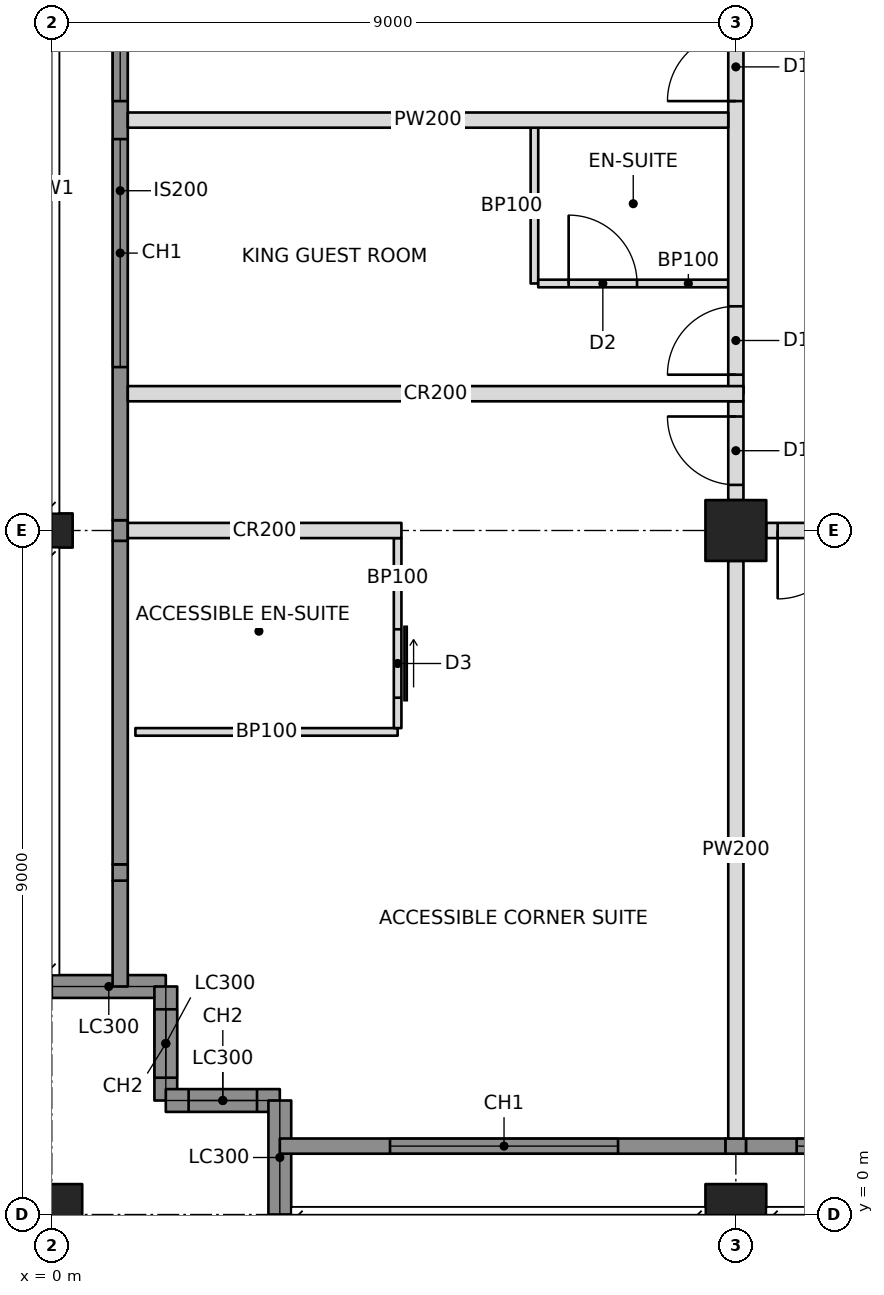
"""IFC4 building model, lengths in metres.
Left out: names, types, materials, properties, quantities, classifications, styles, units other than length and angle.
Written with IfcOpenShell. Run it as: python <this file> out.ifc"""

import sys

from ifc_helpers import new_model, si_unit, direction, frame, frame_2d, origin, origin_with_axes, origin_2d, place, context, subcontext, project, spatial, rectangle, hollow_rectangle, i_section, extrude, element, fill, save


model = new_model("IFC4")
c1 = context("Model", 3, precision=1e-05, world=origin(), true_north=direction((0.0, 1.0)))
c2 = subcontext(c1, "Body", "Model", "MODEL_VIEW")
j1 = project(units=[si_unit("LENGTHUNIT", "METRE"), si_unit("PLANEANGLEUNIT", "RADIAN")], contexts=[c1])
p1 = place(None, origin())
s1 = spatial("IfcSite", under=j1, at=p1, CompositionType="ELEMENT")
p2 = place(p1, origin())
s2 = spatial("IfcBuilding", under=s1, at=p2, CompositionType="ELEMENT")
p3 = place(p2, frame((0.0, 0.0, 180.8)))
s3 = spatial("IfcBuildingStorey", under=s2, at=p3, CompositionType="ELEMENT", Elevation=180.8)
p4 = place(p3, origin_with_axes())
e1 = element("IfcColumn", 1, at=p4, inside=s3, PredefinedType="COLUMN", context=c2, shape_type="SweptSolid", body=[
    extrude(hollow_rectangle(XDim=0.8, YDim=0.8, WallThickness=0.07, at=origin_2d()), origin(), (0.0, 0.0, 1.0), 3.4),
])
p5 = place(p3, frame((0.0, 9.0, 0.0), z_axis=(0.0, 0.0, 1.0), x_axis=(0.0, 1.0, 0.0)))
e2 = element("IfcColumn", 2, at=p5, inside=s3, PredefinedType="COLUMN", context=c2, shape_type="SweptSolid", body=[
    extrude(i_section(OverallWidth=0.449, OverallDepth=0.549, WebThickness=0.072, FlangeThickness=0.115, at=origin_2d()), origin(), (0.0, 0.0, 1.0), 3.4),
])
p6 = place(p3, frame((9.0, 0.0, 0.0), z_axis=(0.0, 0.0, 1.0), x_axis=(1.0, 0.0, 0.0)))
e3 = element("IfcColumn", 3, at=p6, inside=s3, PredefinedType="COLUMN", context=c2, shape_type="SweptSolid", body=[
    extrude(hollow_rectangle(XDim=0.8, YDim=0.8, WallThickness=0.07, at=origin_2d()), origin(), (0.0, 0.0, 1.0), 3.4),
])
p7 = place(p3, frame((9.0, 9.0, 0.0), z_axis=(0.0, 0.0, 1.0), x_axis=(1.0, 0.0, 0.0)))
e4 = element("IfcColumn", 4, at=p7, inside=s3, PredefinedType="COLUMN", context=c2, shape_type="SweptSolid", body=[
    extrude(hollow_rectangle(XDim=0.8, YDim=0.8, WallThickness=0.06, at=origin_2d()), origin(), (0.0, 0.0, 1.0), 3.4),
])
p8 = place(p3, frame((0.0, 3.0, 0.0), z_axis=(0.0, 0.0, 1.0), x_axis=(1.0, 0.0, 0.0)))
e5 = element("IfcWall", 5, at=p8, inside=s3, PredefinedType="SOLIDWALL", context=c2, shape_type="SweptSolid", body=[
    extrude(rectangle(XDim=1.5, YDim=0.3, at=frame_2d((0.75, 0.0))), origin(), (0.0, 0.0, 1.0), 2.42),
])
p9 = place(p3, frame((1.5, 3.0, 0.0), z_axis=(0.0, 0.0, 1.0), x_axis=(0.0, -1.0, 0.0)))
e6 = element("IfcWall", 6, at=p9, inside=s3, PredefinedType="SOLIDWALL", context=c2, shape_type="SweptSolid", body=[
    extrude(rectangle(XDim=1.5, YDim=0.3, at=frame_2d((0.75, 0.0))), origin(), (0.0, 0.0, 1.0), 3.2),
])
p10 = place(p9, frame((0.3, 0.0, 0.6)))
e7 = element("IfcOpeningElement", 7, at=p10, cuts=e6, PredefinedType="OPENING", context=c2, shape_type="SweptSolid", body=[
    extrude(rectangle(XDim=0.9, YDim=2.2, at=frame_2d((0.45, 1.1))), frame((0.0, 0.16, 0.0), z_axis=(0.0, -1.0, 0.0), x_axis=(1.0, 0.0, 0.0)), (0.0, 0.0, 1.0), 0.32),
])
p11 = place(p3, frame((1.5, 1.5, 0.0), z_axis=(0.0, 0.0, 1.0), x_axis=(1.0, 0.0, 0.0)))
e8 = element("IfcWall", 8, at=p11, inside=s3, PredefinedType="SOLIDWALL", context=c2, shape_type="SweptSolid", body=[
    extrude(rectangle(XDim=1.5, YDim=0.3, at=frame_2d((0.75, 0.0))), origin(), (0.0, 0.0, 1.0), 3.2),
])
p12 = place(p11, frame((0.3, 0.0, 0.6)))
e9 = element("IfcOpeningElement", 9, at=p12, cuts=e8, PredefinedType="OPENING", context=c2, shape_type="SweptSolid", body=[
    extrude(rectangle(XDim=0.9, YDim=2.2, at=frame_2d((0.45, 1.1))), frame((0.0, 0.16, 0.0), z_axis=(0.0, -1.0, 0.0), x_axis=(1.0, 0.0, 0.0)), (0.0, 0.0, 1.0), 0.32),
])
p13 = place(p3, frame((3.0, 1.5, 0.0), z_axis=(0.0, 0.0, 1.0), x_axis=(0.0, -1.0, 0.0)))
e10 = element("IfcWall", 10, at=p13, inside=s3, PredefinedType="SOLIDWALL", context=c2, shape_type="SweptSolid", body=[
    extrude(rectangle(XDim=1.5, YDim=0.3, at=frame_2d((0.75, 0.0))), origin(), (0.0, 0.0, 1.0), 2.42),
])
p14 = place(p3, frame((3.0, 0.9, 0.0), z_axis=(0.0, 0.0, 1.0), x_axis=(1.0, 0.0, 0.0)))
e11 = element("IfcWall", 11, at=p14, inside=s3, PredefinedType="SOLIDWALL", context=c2, shape_type="SweptSolid", body=[
    extrude(rectangle(XDim=5.865, YDim=0.2, at=frame_2d((2.932, 0.0))), origin(), (0.0, 0.0, 1.0), 3.2),
])
p15 = place(p14, frame((1.45, 0.0, 0.6)))
e12 = element("IfcOpeningElement", 12, at=p15, cuts=e11, PredefinedType="OPENING", context=c2, shape_type="SweptSolid", body=[
    extrude(rectangle(XDim=3.0, YDim=2.2, at=frame_2d((1.5, 1.1))), frame((0.0, 0.11, 0.0), z_axis=(0.0, -1.0, 0.0), x_axis=(1.0, 0.0, 0.0)), (0.0, 0.0, 1.0), 0.22),
])
p16 = place(p3, frame((0.9, 3.0, 0.0), z_axis=(0.0, 0.0, 1.0), x_axis=(0.0, 1.0, 0.0)))
e13 = element("IfcWall", 13, at=p16, inside=s3, PredefinedType="SOLIDWALL", context=c2, shape_type="SweptSolid", body=[
    extrude(rectangle(XDim=1.393, YDim=0.2, at=frame_2d((0.696, 0.0))), origin(), (0.0, 0.0, 1.0), 3.2),
])
p17 = place(p3, frame((1.0, 9.0, 0.0), z_axis=(0.0, 0.0, 1.0), x_axis=(1.0, 0.0, 0.0)))
e14 = element("IfcWall", 14, at=p17, inside=s3, PredefinedType="PARTITIONING", context=c2, shape_type="SweptSolid", body=[
    extrude(rectangle(XDim=3.6, YDim=0.2, at=frame_2d((1.8, 0.0))), origin(), (0.0, 0.0, 1.0), 2.438),
])
p18 = place(p3, frame((9.4, 9.0, 0.0), z_axis=(0.0, 0.0, 1.0), x_axis=(1.0, 0.0, 0.0)))
e15 = element("IfcWall", 15, at=p18, inside=s3, PredefinedType="PARTITIONING", context=c2, shape_type="SweptSolid", body=[
    extrude(rectangle(XDim=8.2, YDim=0.2, at=frame_2d((4.1, 0.0))), origin(), (0.0, 0.0, 1.0), 2.405),
])
p19 = place(p18, frame((0.15, 0.0, 0.0)))
e16 = element("IfcOpeningElement", 16, at=p19, cuts=e15, PredefinedType="OPENING", context=c2, shape_type="SweptSolid", body=[
    extrude(rectangle(XDim=0.9, YDim=2.1, at=frame_2d((0.45, 1.05))), frame((0.0, 0.11, 0.0), z_axis=(0.0, -1.0, 0.0), x_axis=(1.0, 0.0, 0.0)), (0.0, 0.0, 1.0), 0.22),
])
p20 = place(p3, frame((9.0, 10.8, 0.0), z_axis=(0.0, 0.0, 1.0), x_axis=(0.0, 1.0, 0.0)))
e17 = element("IfcWall", 17, at=p20, inside=s3, PredefinedType="PARTITIONING", context=c2, shape_type="SweptSolid", body=[
    extrude(rectangle(XDim=6.8, YDim=0.2, at=frame_2d((3.4, 0.0))), origin(), (0.0, 0.0, 1.0), 2.405),
])
p21 = place(p20, frame((0.25, 0.0, 0.0)))
e18 = element("IfcOpeningElement", 18, at=p21, cuts=e17, PredefinedType="OPENING", context=c2, shape_type="SweptSolid", body=[
    extrude(rectangle(XDim=0.9, YDim=2.1, at=frame_2d((0.45, 1.05))), frame((0.0, 0.11, 0.0), z_axis=(0.0, -1.0, 0.0), x_axis=(1.0, 0.0, 0.0)), (0.0, 0.0, 1.0), 0.22),
])
p22 = place(p20, frame((3.85, 0.0, 0.0)))
e19 = element("IfcOpeningElement", 19, at=p22, cuts=e17, PredefinedType="OPENING", context=c2, shape_type="SweptSolid", body=[
    extrude(rectangle(XDim=0.9, YDim=2.1, at=frame_2d((0.45, 1.05))), frame((0.0, 0.11, 0.0), z_axis=(0.0, -1.0, 0.0), x_axis=(1.0, 0.0, 0.0)), (0.0, 0.0, 1.0), 0.22),
])
p23 = place(p3, frame((1.0, 10.8, 0.0), z_axis=(0.0, 0.0, 1.0), x_axis=(1.0, 0.0, 0.0)))
e20 = element("IfcWall", 20, at=p23, inside=s3, PredefinedType="PARTITIONING", context=c2, shape_type="SweptSolid", body=[
    extrude(rectangle(XDim=8.1, YDim=0.2, at=frame_2d((4.05, 0.0))), origin(), (0.0, 0.0, 1.0), 2.404),
])
p24 = place(p3, frame((9.0, 8.6, 0.0), z_axis=(0.0, 0.0, 1.0), x_axis=(0.0, -1.0, 0.0)))
e21 = element("IfcWall", 21, at=p24, inside=s3, PredefinedType="PARTITIONING", context=c2, shape_type="SweptSolid", body=[
    extrude(rectangle(XDim=7.6, YDim=0.2, at=frame_2d((3.8, 0.0))), origin(), (0.0, 0.0, 1.0), 2.438),
])
p25 = place(p3, frame((1.1, 6.35, 0.0), z_axis=(0.0, 0.0, 1.0), x_axis=(1.0, 0.0, 0.0)))
e22 = element("IfcWall", 22, at=p25, inside=s3, PredefinedType="PARTITIONING", context=c2, shape_type="SweptSolid", body=[
    extrude(rectangle(XDim=3.45, YDim=0.1, at=frame_2d((1.725, 0.0))), origin(), (0.0, 0.0, 1.0), 3.2),
])
p26 = place(p3, frame((4.55, 8.9, 0.0), z_axis=(0.0, 0.0, 1.0), x_axis=(0.0, -1.0, 0.0)))
e23 = element("IfcWall", 23, at=p26, inside=s3, PredefinedType="PARTITIONING", context=c2, shape_type="SweptSolid", body=[
    extrude(rectangle(XDim=2.5, YDim=0.1, at=frame_2d((1.25, 0.0))), origin(), (0.0, 0.0, 1.0), 2.438),
])
p27 = place(p26, frame((1.2, 0.0, 0.0)))
e24 = element("IfcOpeningElement", 24, at=p27, cuts=e23, PredefinedType="OPENING", context=c2, shape_type="SweptSolid", body=[
    extrude(rectangle(XDim=0.9, YDim=2.1, at=frame_2d((0.45, 1.05))), frame((0.0, 0.06, 0.0), z_axis=(0.0, -1.0, 0.0), x_axis=(1.0, 0.0, 0.0)), (0.0, 0.0, 1.0), 0.12),
])
p28 = place(p3, frame((8.9, 14.4, 0.0), z_axis=(0.0, 0.0, 1.0), x_axis=(-1.0, 0.0, 0.0)))
e25 = element("IfcWall", 25, at=p28, inside=s3, PredefinedType="PARTITIONING", context=c2, shape_type="SweptSolid", body=[
    extrude(rectangle(XDim=7.9, YDim=0.2, at=frame_2d((3.95, 0.0))), origin(), (0.0, 0.0, 1.0), 2.404),
])
p29 = place(p3, frame((6.35, 12.25, 0.0), z_axis=(0.0, 0.0, 1.0), x_axis=(0.0, 1.0, 0.0)))
e26 = element("IfcWall", 26, at=p29, inside=s3, PredefinedType="PARTITIONING", context=c2, shape_type="SweptSolid", body=[
    extrude(rectangle(XDim=2.05, YDim=0.1, at=frame_2d((1.025, 0.0))), origin(), (0.0, 0.0, 1.0), 3.2),
])
p30 = place(p3, frame((8.9, 12.25, 0.0), z_axis=(0.0, 0.0, 1.0), x_axis=(-1.0, 0.0, 0.0)))
e27 = element("IfcWall", 27, at=p30, inside=s3, PredefinedType="PARTITIONING", context=c2, shape_type="SweptSolid", body=[
    extrude(rectangle(XDim=2.5, YDim=0.1, at=frame_2d((1.25, 0.0))), origin(), (0.0, 0.0, 1.0), 2.404),
])
p31 = place(p30, frame((1.2, 0.0, 0.0)))
e28 = element("IfcOpeningElement", 28, at=p31, cuts=e27, PredefinedType="OPENING", context=c2, shape_type="SweptSolid", body=[
    extrude(rectangle(XDim=0.9, YDim=2.1, at=frame_2d((0.45, 1.05))), frame((0.0, 0.06, 0.0), z_axis=(0.0, -1.0, 0.0), x_axis=(1.0, 0.0, 0.0)), (0.0, 0.0, 1.0), 0.12),
])
p32 = place(p3, frame((9.0, 9.4, 0.0), z_axis=(0.0, 0.0, 1.0), x_axis=(0.0, 1.0, 0.0)))
e29 = element("IfcWall", 29, at=p32, inside=s3, PredefinedType="PARTITIONING", context=c2, shape_type="SweptSolid", body=[
    extrude(rectangle(XDim=1.3, YDim=0.2, at=frame_2d((0.65, 0.0))), origin(), (0.0, 0.0, 1.0), 2.405),
])
p33 = place(p32, frame((0.2, 0.0, 0.0)))
e30 = element("IfcOpeningElement", 30, at=p33, cuts=e29, PredefinedType="OPENING", context=c2, shape_type="SweptSolid", body=[
    extrude(rectangle(XDim=0.9, YDim=2.1, at=frame_2d((0.45, 1.05))), frame((0.0, 0.11, 0.0), z_axis=(0.0, -1.0, 0.0), x_axis=(1.0, 0.0, 0.0)), (0.0, 0.0, 1.0), 0.22),
])
p34 = place(p3, frame((8.865, 0.9, 0.0), z_axis=(0.0, 0.0, 1.0), x_axis=(1.0, 0.0, 0.0)))
e31 = element("IfcWall", 31, at=p34, inside=s3, PredefinedType="SOLIDWALL", context=c2, shape_type="SweptSolid", body=[
    extrude(rectangle(XDim=0.271, YDim=0.2, at=frame_2d((0.135, 0.0))), origin(), (0.0, 0.0, 1.0), 2.438),
])
p35 = place(p3, frame((9.135, 0.9, 0.0), z_axis=(0.0, 0.0, 1.0), x_axis=(1.0, 0.0, 0.0)))
e32 = element("IfcWall", 32, at=p35, inside=s3, PredefinedType="SOLIDWALL", context=c2, shape_type="SweptSolid", body=[
    extrude(rectangle(XDim=8.671, YDim=0.2, at=frame_2d((4.335, 0.0))), origin(), (0.0, 0.0, 1.0), 3.2),
])
p36 = place(p35, frame((0.665, 0.0, 0.6)))
e33 = element("IfcOpeningElement", 33, at=p36, cuts=e32, PredefinedType="OPENING", context=c2, shape_type="SweptSolid", body=[
    extrude(rectangle(XDim=3.0, YDim=2.2, at=frame_2d((1.5, 1.1))), frame((0.0, 0.11, 0.0), z_axis=(0.0, -1.0, 0.0), x_axis=(1.0, 0.0, 0.0)), (0.0, 0.0, 1.0), 0.22),
])
p37 = place(p35, frame((5.065, 0.0, 0.6)))
e34 = element("IfcOpeningElement", 34, at=p37, cuts=e32, PredefinedType="OPENING", context=c2, shape_type="SweptSolid", body=[
    extrude(rectangle(XDim=3.0, YDim=2.2, at=frame_2d((1.5, 1.1))), frame((0.0, 0.11, 0.0), z_axis=(0.0, -1.0, 0.0), x_axis=(1.0, 0.0, 0.0)), (0.0, 0.0, 1.0), 0.22),
])
p38 = place(p3, frame((0.9, 4.393, 0.0), z_axis=(0.0, 0.0, 1.0), x_axis=(0.0, 1.0, 0.0)))
e35 = element("IfcWall", 35, at=p38, inside=s3, PredefinedType="SOLIDWALL", context=c2, shape_type="SweptSolid", body=[
    extrude(rectangle(XDim=0.215, YDim=0.2, at=frame_2d((0.107, 0.0))), origin(), (0.0, 0.0, 1.0), 2.661),
])
p39 = place(p3, frame((0.9, 4.607, 0.0), z_axis=(0.0, 0.0, 1.0), x_axis=(0.0, 1.0, 0.0)))
e36 = element("IfcWall", 36, at=p39, inside=s3, PredefinedType="SOLIDWALL", context=c2, shape_type="SweptSolid", body=[
    extrude(rectangle(XDim=4.257, YDim=0.2, at=frame_2d((2.129, 0.0))), origin(), (0.0, 0.0, 1.0), 3.2),
])
p40 = place(p3, frame((0.9, 8.865, 0.0), z_axis=(0.0, 0.0, 1.0), x_axis=(0.0, 1.0, 0.0)))
e37 = element("IfcWall", 37, at=p40, inside=s3, PredefinedType="SOLIDWALL", context=c2, shape_type="SweptSolid", body=[
    extrude(rectangle(XDim=0.271, YDim=0.2, at=frame_2d((0.135, 0.0))), origin(), (0.0, 0.0, 1.0), 2.438),
])
p41 = place(p3, frame((0.9, 9.135, 0.0), z_axis=(0.0, 0.0, 1.0), x_axis=(0.0, 1.0, 0.0)))
e38 = element("IfcWall", 38, at=p41, inside=s3, PredefinedType="SOLIDWALL", context=c2, shape_type="SweptSolid", body=[
    extrude(rectangle(XDim=8.671, YDim=0.2, at=frame_2d((4.335, 0.0))), origin(), (0.0, 0.0, 1.0), 3.2),
])
p42 = place(p41, frame((2.015, 0.0, 0.6)))
e39 = element("IfcOpeningElement", 39, at=p42, cuts=e38, PredefinedType="OPENING", context=c2, shape_type="SweptSolid", body=[
    extrude(rectangle(XDim=3.0, YDim=2.2, at=frame_2d((1.5, 1.1))), frame((0.0, 0.11, 0.0), z_axis=(0.0, -1.0, 0.0), x_axis=(1.0, 0.0, 0.0)), (0.0, 0.0, 1.0), 0.22),
])
p43 = place(p41, frame((5.515, 0.0, 0.6)))
e40 = element("IfcOpeningElement", 40, at=p43, cuts=e38, PredefinedType="OPENING", context=c2, shape_type="SweptSolid", body=[
    extrude(rectangle(XDim=3.0, YDim=2.2, at=frame_2d((1.5, 1.1))), frame((0.0, 0.11, 0.0), z_axis=(0.0, -1.0, 0.0), x_axis=(1.0, 0.0, 0.0)), (0.0, 0.0, 1.0), 0.22),
])
p44 = place(p10, origin())
e41 = element("IfcWindow", 41, at=p44, inside=s3, PartitioningType="SINGLE_PANEL", PredefinedType="WINDOW", context=c2, shape_type="SweptSolid", body=[
    extrude(rectangle(XDim=0.9, YDim=2.2, at=frame_2d((0.45, 1.1))), frame((0.0, 0.03, 0.0), z_axis=(0.0, -1.0, 0.0), x_axis=(1.0, 0.0, 0.0)), (0.0, 0.0, 1.0), 0.06),
])
fill(e7, e41)
p45 = place(p12, origin())
e42 = element("IfcWindow", 42, at=p45, inside=s3, PartitioningType="SINGLE_PANEL", PredefinedType="WINDOW", context=c2, shape_type="SweptSolid", body=[
    extrude(rectangle(XDim=0.9, YDim=2.2, at=frame_2d((0.45, 1.1))), frame((0.0, 0.03, 0.0), z_axis=(0.0, -1.0, 0.0), x_axis=(1.0, 0.0, 0.0)), (0.0, 0.0, 1.0), 0.06),
])
fill(e9, e42)
p46 = place(p15, origin())
e43 = element("IfcWindow", 43, at=p46, inside=s3, PartitioningType="TRIPLE_PANEL_VERTICAL", PredefinedType="WINDOW", context=c2, shape_type="SweptSolid", body=[
    extrude(rectangle(XDim=3.0, YDim=2.2, at=frame_2d((1.5, 1.1))), frame((0.0, 0.03, 0.0), z_axis=(0.0, -1.0, 0.0), x_axis=(1.0, 0.0, 0.0)), (0.0, 0.0, 1.0), 0.06),
])
fill(e12, e43)
p47 = place(p36, origin())
e44 = element("IfcWindow", 44, at=p47, inside=s3, PartitioningType="TRIPLE_PANEL_VERTICAL", PredefinedType="WINDOW", context=c2, shape_type="SweptSolid", body=[
    extrude(rectangle(XDim=3.0, YDim=2.2, at=frame_2d((1.5, 1.1))), frame((0.0, 0.03, 0.0), z_axis=(0.0, -1.0, 0.0), x_axis=(1.0, 0.0, 0.0)), (0.0, 0.0, 1.0), 0.06),
])
fill(e33, e44)
p48 = place(p42, origin())
e45 = element("IfcWindow", 45, at=p48, inside=s3, PartitioningType="TRIPLE_PANEL_VERTICAL", PredefinedType="WINDOW", context=c2, shape_type="SweptSolid", body=[
    extrude(rectangle(XDim=3.0, YDim=2.2, at=frame_2d((1.5, 1.1))), frame((0.0, 0.03, 0.0), z_axis=(0.0, -1.0, 0.0), x_axis=(1.0, 0.0, 0.0)), (0.0, 0.0, 1.0), 0.06),
])
fill(e39, e45)
p49 = place(p43, origin())
e46 = element("IfcWindow", 46, at=p49, inside=s3, PartitioningType="TRIPLE_PANEL_VERTICAL", PredefinedType="WINDOW", context=c2, shape_type="SweptSolid", body=[
    extrude(rectangle(XDim=3.0, YDim=2.2, at=frame_2d((1.5, 1.1))), frame((0.0, 0.03, 0.0), z_axis=(0.0, -1.0, 0.0), x_axis=(1.0, 0.0, 0.0)), (0.0, 0.0, 1.0), 0.06),
])
fill(e40, e46)
p50 = place(p27, origin())
e47 = element("IfcDoor", 47, at=p50, inside=s3, OperationType="SLIDING_TO_LEFT", PredefinedType="DOOR", context=c2, shape_type="SweptSolid", body=[
    extrude(rectangle(XDim=0.9, YDim=2.1, at=frame_2d((0.45, 1.05))), frame((0.0, 0.025, 0.0), z_axis=(0.0, -1.0, 0.0), x_axis=(1.0, 0.0, 0.0)), (0.0, 0.0, 1.0), 0.05),
])
fill(e24, e47)
p51 = place(p19, frame((0.9, 0.0, 0.0), z_axis=(0.0, 0.0, 1.0), x_axis=(-1.0, 0.0, 0.0)))
e48 = element("IfcDoor", 48, at=p51, inside=s3, OperationType="SINGLE_SWING_RIGHT", PredefinedType="DOOR", context=c2, shape_type="SweptSolid", body=[
    extrude(rectangle(XDim=0.9, YDim=2.1, at=frame_2d((0.45, 1.05))), frame((0.0, 0.025, 0.0), z_axis=(0.0, -1.0, 0.0), x_axis=(1.0, 0.0, 0.0)), (0.0, 0.0, 1.0), 0.05),
])
fill(e16, e48)
p52 = place(p31, frame((0.9, 0.0, 0.0), z_axis=(0.0, 0.0, 1.0), x_axis=(-1.0, 0.0, 0.0)))
e49 = element("IfcDoor", 49, at=p52, inside=s3, OperationType="SINGLE_SWING_LEFT", PredefinedType="DOOR", context=c2, shape_type="SweptSolid", body=[
    extrude(rectangle(XDim=0.9, YDim=2.1, at=frame_2d((0.45, 1.05))), frame((0.0, 0.025, 0.0), z_axis=(0.0, -1.0, 0.0), x_axis=(1.0, 0.0, 0.0)), (0.0, 0.0, 1.0), 0.05),
])
fill(e28, e49)
p53 = place(p21, origin())
e50 = element("IfcDoor", 50, at=p53, inside=s3, OperationType="SINGLE_SWING_LEFT", PredefinedType="DOOR", context=c2, shape_type="SweptSolid", body=[
    extrude(rectangle(XDim=0.9, YDim=2.1, at=frame_2d((0.45, 1.05))), frame((0.0, 0.025, 0.0), z_axis=(0.0, -1.0, 0.0), x_axis=(1.0, 0.0, 0.0)), (0.0, 0.0, 1.0), 0.05),
])
fill(e18, e50)
p54 = place(p22, origin())
e51 = element("IfcDoor", 51, at=p54, inside=s3, OperationType="SINGLE_SWING_LEFT", PredefinedType="DOOR", context=c2, shape_type="SweptSolid", body=[
    extrude(rectangle(XDim=0.9, YDim=2.1, at=frame_2d((0.45, 1.05))), frame((0.0, 0.025, 0.0), z_axis=(0.0, -1.0, 0.0), x_axis=(1.0, 0.0, 0.0)), (0.0, 0.0, 1.0), 0.05),
])
fill(e19, e51)
p55 = place(p33, origin())
e52 = element("IfcDoor", 52, at=p55, inside=s3, OperationType="SINGLE_SWING_RIGHT", PredefinedType="DOOR", context=c2, shape_type="SweptSolid", body=[
    extrude(rectangle(XDim=0.9, YDim=2.1, at=frame_2d((0.45, 1.05))), frame((0.0, 0.025, 0.0), z_axis=(0.0, -1.0, 0.0), x_axis=(1.0, 0.0, 0.0)), (0.0, 0.0, 1.0), 0.05),
])
fill(e30, e52)
save(model, sys.argv[1])
